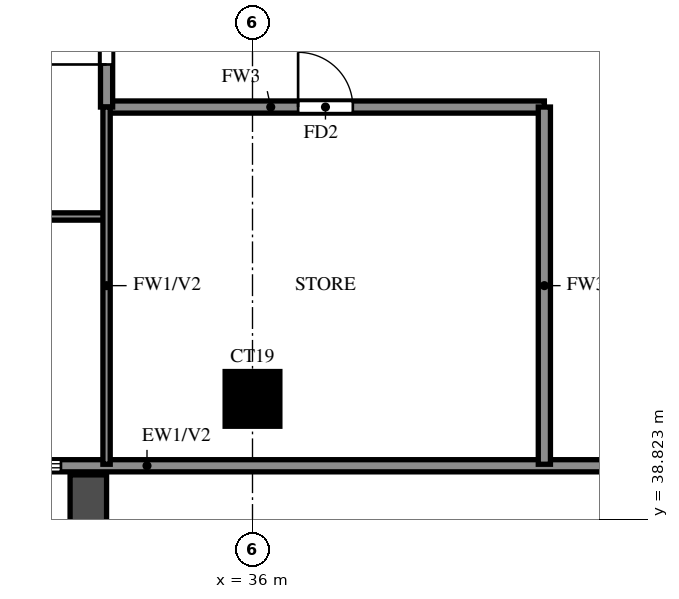
"""IFC4 building model, lengths in metres.
Left out: names, types, materials, properties, quantities, classifications, styles, units other than length and angle.
Written with IfcOpenShell. Run it as: python <this file> out.ifc"""

import sys

from ifc_helpers import new_model, si_unit, direction, frame, frame_2d, origin, origin_2d, place, context, subcontext, project, spatial, rectangle, extrude, source, transform, mapped, element, fill, save


model = new_model("IFC4")
c1 = context("Model", 3, precision=1e-05, world=origin(), true_north=direction((0.0, 1.0)))
c2 = subcontext(c1, "Body", "Model", "MODEL_VIEW")
j1 = project(units=[si_unit("LENGTHUNIT", "METRE"), si_unit("PLANEANGLEUNIT", "RADIAN")], contexts=[c1])
p1 = place(None, origin())
s1 = spatial("IfcSite", under=j1, at=p1, CompositionType="ELEMENT")
p2 = place(p1, origin())
s2 = spatial("IfcBuilding", under=s1, at=p2, CompositionType="ELEMENT")
p3 = place(p2, frame((0.0, 0.0, 181.5)))
s3 = spatial("IfcBuildingStorey", under=s2, at=p3, CompositionType="ELEMENT", Elevation=181.5)
m1 = source(origin(), c2, "Body", "SweptSolid", [
    extrude(rectangle(XDim=0.9, YDim=0.9, at=origin_2d()), origin(), (0.0, 0.0, 1.0), 3.2),
])
p4 = place(p3, frame((36.0, 40.8, 0.0), z_axis=(0.0, 0.0, 1.0), x_axis=(1.0, 0.0, 0.0)))
e1 = element("IfcColumn", 1, at=p4, inside=s3, PredefinedType="COLUMN", context=c2, shape_type="MappedRepresentation", body=[
    mapped(m1, transform((0.0, 0.0, 0.0))),
])
p5 = place(p3, frame((18.2, 39.7, 0.0), z_axis=(0.0, 0.0, 1.0), x_axis=(1.0, 0.0, 0.0)))
e2 = element("IfcWall", 2, at=p5, inside=s3, PredefinedType="SOLIDWALL", context=c2, shape_type="SweptSolid", body=[
    extrude(rectangle(XDim=23.8, YDim=0.2, at=frame_2d((11.9, 0.0))), origin(), (0.0, 0.0, 1.0), 3.2),
])
p6 = place(p5, frame((11.5, 0.0, 0.0)))
e3 = element("IfcOpeningElement", 3, at=p6, cuts=e2, PredefinedType="OPENING", context=c2, shape_type="SweptSolid", body=[
    extrude(rectangle(XDim=1.8, YDim=2.4, at=frame_2d((0.9, 1.2))), frame((0.0, 0.11, 0.0), z_axis=(0.0, -1.0, 0.0), x_axis=(1.0, 0.0, 0.0)), (0.0, 0.0, 1.0), 0.22),
])
p7 = place(p5, frame((0.9, 0.0, 0.6)))
e4 = element("IfcOpeningElement", 4, at=p7, cuts=e2, PredefinedType="OPENING", context=c2, shape_type="SweptSolid", body=[
    extrude(rectangle(XDim=2.4, YDim=2.4, at=frame_2d((1.2, 1.2))), frame((0.0, 0.11, 0.0), z_axis=(0.0, -1.0, 0.0), x_axis=(1.0, 0.0, 0.0)), (0.0, 0.0, 1.0), 0.22),
])
p8 = place(p5, frame((3.9, 0.0, 0.6)))
e5 = element("IfcOpeningElement", 5, at=p8, cuts=e2, PredefinedType="OPENING", context=c2, shape_type="SweptSolid", body=[
    extrude(rectangle(XDim=2.4, YDim=2.4, at=frame_2d((1.2, 1.2))), frame((0.0, 0.11, 0.0), z_axis=(0.0, -1.0, 0.0), x_axis=(1.0, 0.0, 0.0)), (0.0, 0.0, 1.0), 0.22),
])
p9 = place(p5, frame((7.15, 0.0, 0.6)))
e6 = element("IfcOpeningElement", 6, at=p9, cuts=e2, PredefinedType="OPENING", context=c2, shape_type="SweptSolid", body=[
    extrude(rectangle(XDim=0.9, YDim=2.4, at=frame_2d((0.45, 1.2))), frame((0.0, 0.11, 0.0), z_axis=(0.0, -1.0, 0.0), x_axis=(1.0, 0.0, 0.0)), (0.0, 0.0, 1.0), 0.22),
])
p10 = place(p5, frame((9.1, 0.0, 0.6)))
e7 = element("IfcOpeningElement", 7, at=p10, cuts=e2, PredefinedType="OPENING", context=c2, shape_type="SweptSolid", body=[
    extrude(rectangle(XDim=1.2, YDim=2.4, at=frame_2d((0.6, 1.2))), frame((0.0, 0.11, 0.0), z_axis=(0.0, -1.0, 0.0), x_axis=(1.0, 0.0, 0.0)), (0.0, 0.0, 1.0), 0.22),
])
p11 = place(p5, frame((13.75, 0.0, 0.6)))
e8 = element("IfcOpeningElement", 8, at=p11, cuts=e2, PredefinedType="OPENING", context=c2, shape_type="SweptSolid", body=[
    extrude(rectangle(XDim=0.9, YDim=2.4, at=frame_2d((0.45, 1.2))), frame((0.0, 0.11, 0.0), z_axis=(0.0, -1.0, 0.0), x_axis=(1.0, 0.0, 0.0)), (0.0, 0.0, 1.0), 0.22),
])
p12 = place(p3, frame((33.3, 39.55, 0.0), z_axis=(0.0, 0.0, 1.0), x_axis=(0.0, -1.0, 0.0)))
e9 = element("IfcWall", 9, at=p12, inside=s3, PredefinedType="SOLIDWALL", context=c2, shape_type="SweptSolid", body=[
    extrude(rectangle(XDim=2.65, YDim=0.6, at=frame_2d((1.325, 0.0))), origin(), (0.0, 0.0, 1.0), 2.85),
])
p13 = place(p3, frame((33.6, 45.6, 0.0), z_axis=(0.0, 0.0, 1.0), x_axis=(1.0, 0.0, 0.0)))
e10 = element("IfcWall", 10, at=p13, inside=s3, PredefinedType="SOLIDWALL", context=c2, shape_type="SweptSolid", body=[
    extrude(rectangle(XDim=7.2, YDim=0.2, at=frame_2d((3.6, 0.0))), origin(), (0.0, 0.0, 1.0), 3.2),
])
p14 = place(p13, frame((3.15, 0.0, 0.0)))
e11 = element("IfcOpeningElement", 11, at=p14, cuts=e10, PredefinedType="OPENING", context=c2, shape_type="SweptSolid", body=[
    extrude(rectangle(XDim=0.9, YDim=2.1, at=frame_2d((0.45, 1.05))), frame((0.0, 0.11, 0.0), z_axis=(0.0, -1.0, 0.0), x_axis=(1.0, 0.0, 0.0)), (0.0, 0.0, 1.0), 0.22),
])
p15 = place(p3, frame((33.6, 45.6, 0.0), z_axis=(0.0, 0.0, 1.0), x_axis=(0.0, 1.0, 0.0)))
e12 = element("IfcWall", 12, at=p15, inside=s3, PredefinedType="SOLIDWALL", context=c2, shape_type="SweptSolid", body=[
    extrude(rectangle(XDim=8.4, YDim=0.2, at=frame_2d((4.2, 0.0))), origin(), (0.0, 0.0, 1.0), 3.2),
])
p16 = place(p15, frame((0.7, 0.0, 0.0)))
e13 = element("IfcOpeningElement", 13, at=p16, cuts=e12, PredefinedType="OPENING", context=c2, shape_type="SweptSolid", body=[
    extrude(rectangle(XDim=1.0, YDim=2.1, at=frame_2d((0.5, 1.05))), frame((0.0, 0.11, 0.0), z_axis=(0.0, -1.0, 0.0), x_axis=(1.0, 0.0, 0.0)), (0.0, 0.0, 1.0), 0.22),
])
p17 = place(p15, frame((6.7, 0.0, 0.0)))
e14 = element("IfcOpeningElement", 14, at=p17, cuts=e12, PredefinedType="OPENING", context=c2, shape_type="SweptSolid", body=[
    extrude(rectangle(XDim=1.0, YDim=2.1, at=frame_2d((0.5, 1.05))), frame((0.0, 0.11, 0.0), z_axis=(0.0, -1.0, 0.0), x_axis=(1.0, 0.0, 0.0)), (0.0, 0.0, 1.0), 0.22),
])
p18 = place(p3, frame((40.8, 39.725, 0.0), z_axis=(0.0, 0.0, 1.0), x_axis=(0.0, 1.0, 0.0)))
e15 = element("IfcWall", 15, at=p18, inside=s3, PredefinedType="SOLIDWALL", context=c2, shape_type="SweptSolid", body=[
    extrude(rectangle(XDim=5.875, YDim=0.2, at=frame_2d((2.938, 0.0))), origin(), (0.0, 0.0, 1.0), 3.2),
])
p19 = place(p3, frame((25.2, 43.8, 0.0), z_axis=(0.0, 0.0, 1.0), x_axis=(1.0, 0.0, 0.0)))
e16 = element("IfcWall", 16, at=p19, inside=s3, PredefinedType="PARTITIONING", context=c2, shape_type="SweptSolid", body=[
    extrude(rectangle(XDim=8.4, YDim=0.12, at=frame_2d((4.2, 0.0))), origin(), (0.0, 0.0, 1.0), 3.2),
])
p20 = place(p19, frame((1.35, 0.0, 0.0)))
e17 = element("IfcOpeningElement", 17, at=p20, cuts=e16, PredefinedType="OPENING", context=c2, shape_type="SweptSolid", body=[
    extrude(rectangle(XDim=0.9, YDim=2.1, at=frame_2d((0.45, 1.05))), frame((0.0, 0.07, 0.0), z_axis=(0.0, -1.0, 0.0), x_axis=(1.0, 0.0, 0.0)), (0.0, 0.0, 1.0), 0.14),
])
p21 = place(p19, frame((5.55, 0.0, 0.0)))
e18 = element("IfcOpeningElement", 18, at=p21, cuts=e16, PredefinedType="OPENING", context=c2, shape_type="SweptSolid", body=[
    extrude(rectangle(XDim=0.9, YDim=2.1, at=frame_2d((0.45, 1.05))), frame((0.0, 0.07, 0.0), z_axis=(0.0, -1.0, 0.0), x_axis=(1.0, 0.0, 0.0)), (0.0, 0.0, 1.0), 0.14),
])
p22 = place(p3, frame((33.6, 39.725, 0.0), z_axis=(0.0, 0.0, 1.0), x_axis=(0.0, 1.0, 0.0)))
e19 = element("IfcWall", 19, at=p22, inside=s3, PredefinedType="PARTITIONING", context=c2, shape_type="SweptSolid", body=[
    extrude(rectangle(XDim=5.875, YDim=0.12, at=frame_2d((2.938, 0.0))), origin(), (0.0, 0.0, 1.0), 3.2),
])
p23 = place(p11, origin())
e20 = element("IfcWindow", 20, at=p23, inside=s3, PartitioningType="SINGLE_PANEL", PredefinedType="WINDOW", context=c2, shape_type="SweptSolid", body=[
    extrude(rectangle(XDim=0.9, YDim=2.4, at=frame_2d((0.45, 1.2))), frame((0.0, 0.03, 0.0), z_axis=(0.0, -1.0, 0.0), x_axis=(1.0, 0.0, 0.0)), (0.0, 0.0, 1.0), 0.06),
])
fill(e8, e20)
p24 = place(p16, origin())
e21 = element("IfcDoor", 21, at=p24, inside=s3, OperationType="SINGLE_SWING_RIGHT", PredefinedType="DOOR", context=c2, shape_type="SweptSolid", body=[
    extrude(rectangle(XDim=1.0, YDim=2.1, at=frame_2d((0.5, 1.05))), frame((0.0, 0.025, 0.0), z_axis=(0.0, -1.0, 0.0), x_axis=(1.0, 0.0, 0.0)), (0.0, 0.0, 1.0), 0.05),
])
fill(e13, e21)
p25 = place(p14, origin())
e22 = element("IfcDoor", 22, at=p25, inside=s3, OperationType="SINGLE_SWING_RIGHT", PredefinedType="DOOR", context=c2, shape_type="SweptSolid", body=[
    extrude(rectangle(XDim=0.9, YDim=2.1, at=frame_2d((0.45, 1.05))), frame((0.0, 0.025, 0.0), z_axis=(0.0, -1.0, 0.0), x_axis=(1.0, 0.0, 0.0)), (0.0, 0.0, 1.0), 0.05),
])
fill(e11, e22)
save(model, sys.argv[1])
